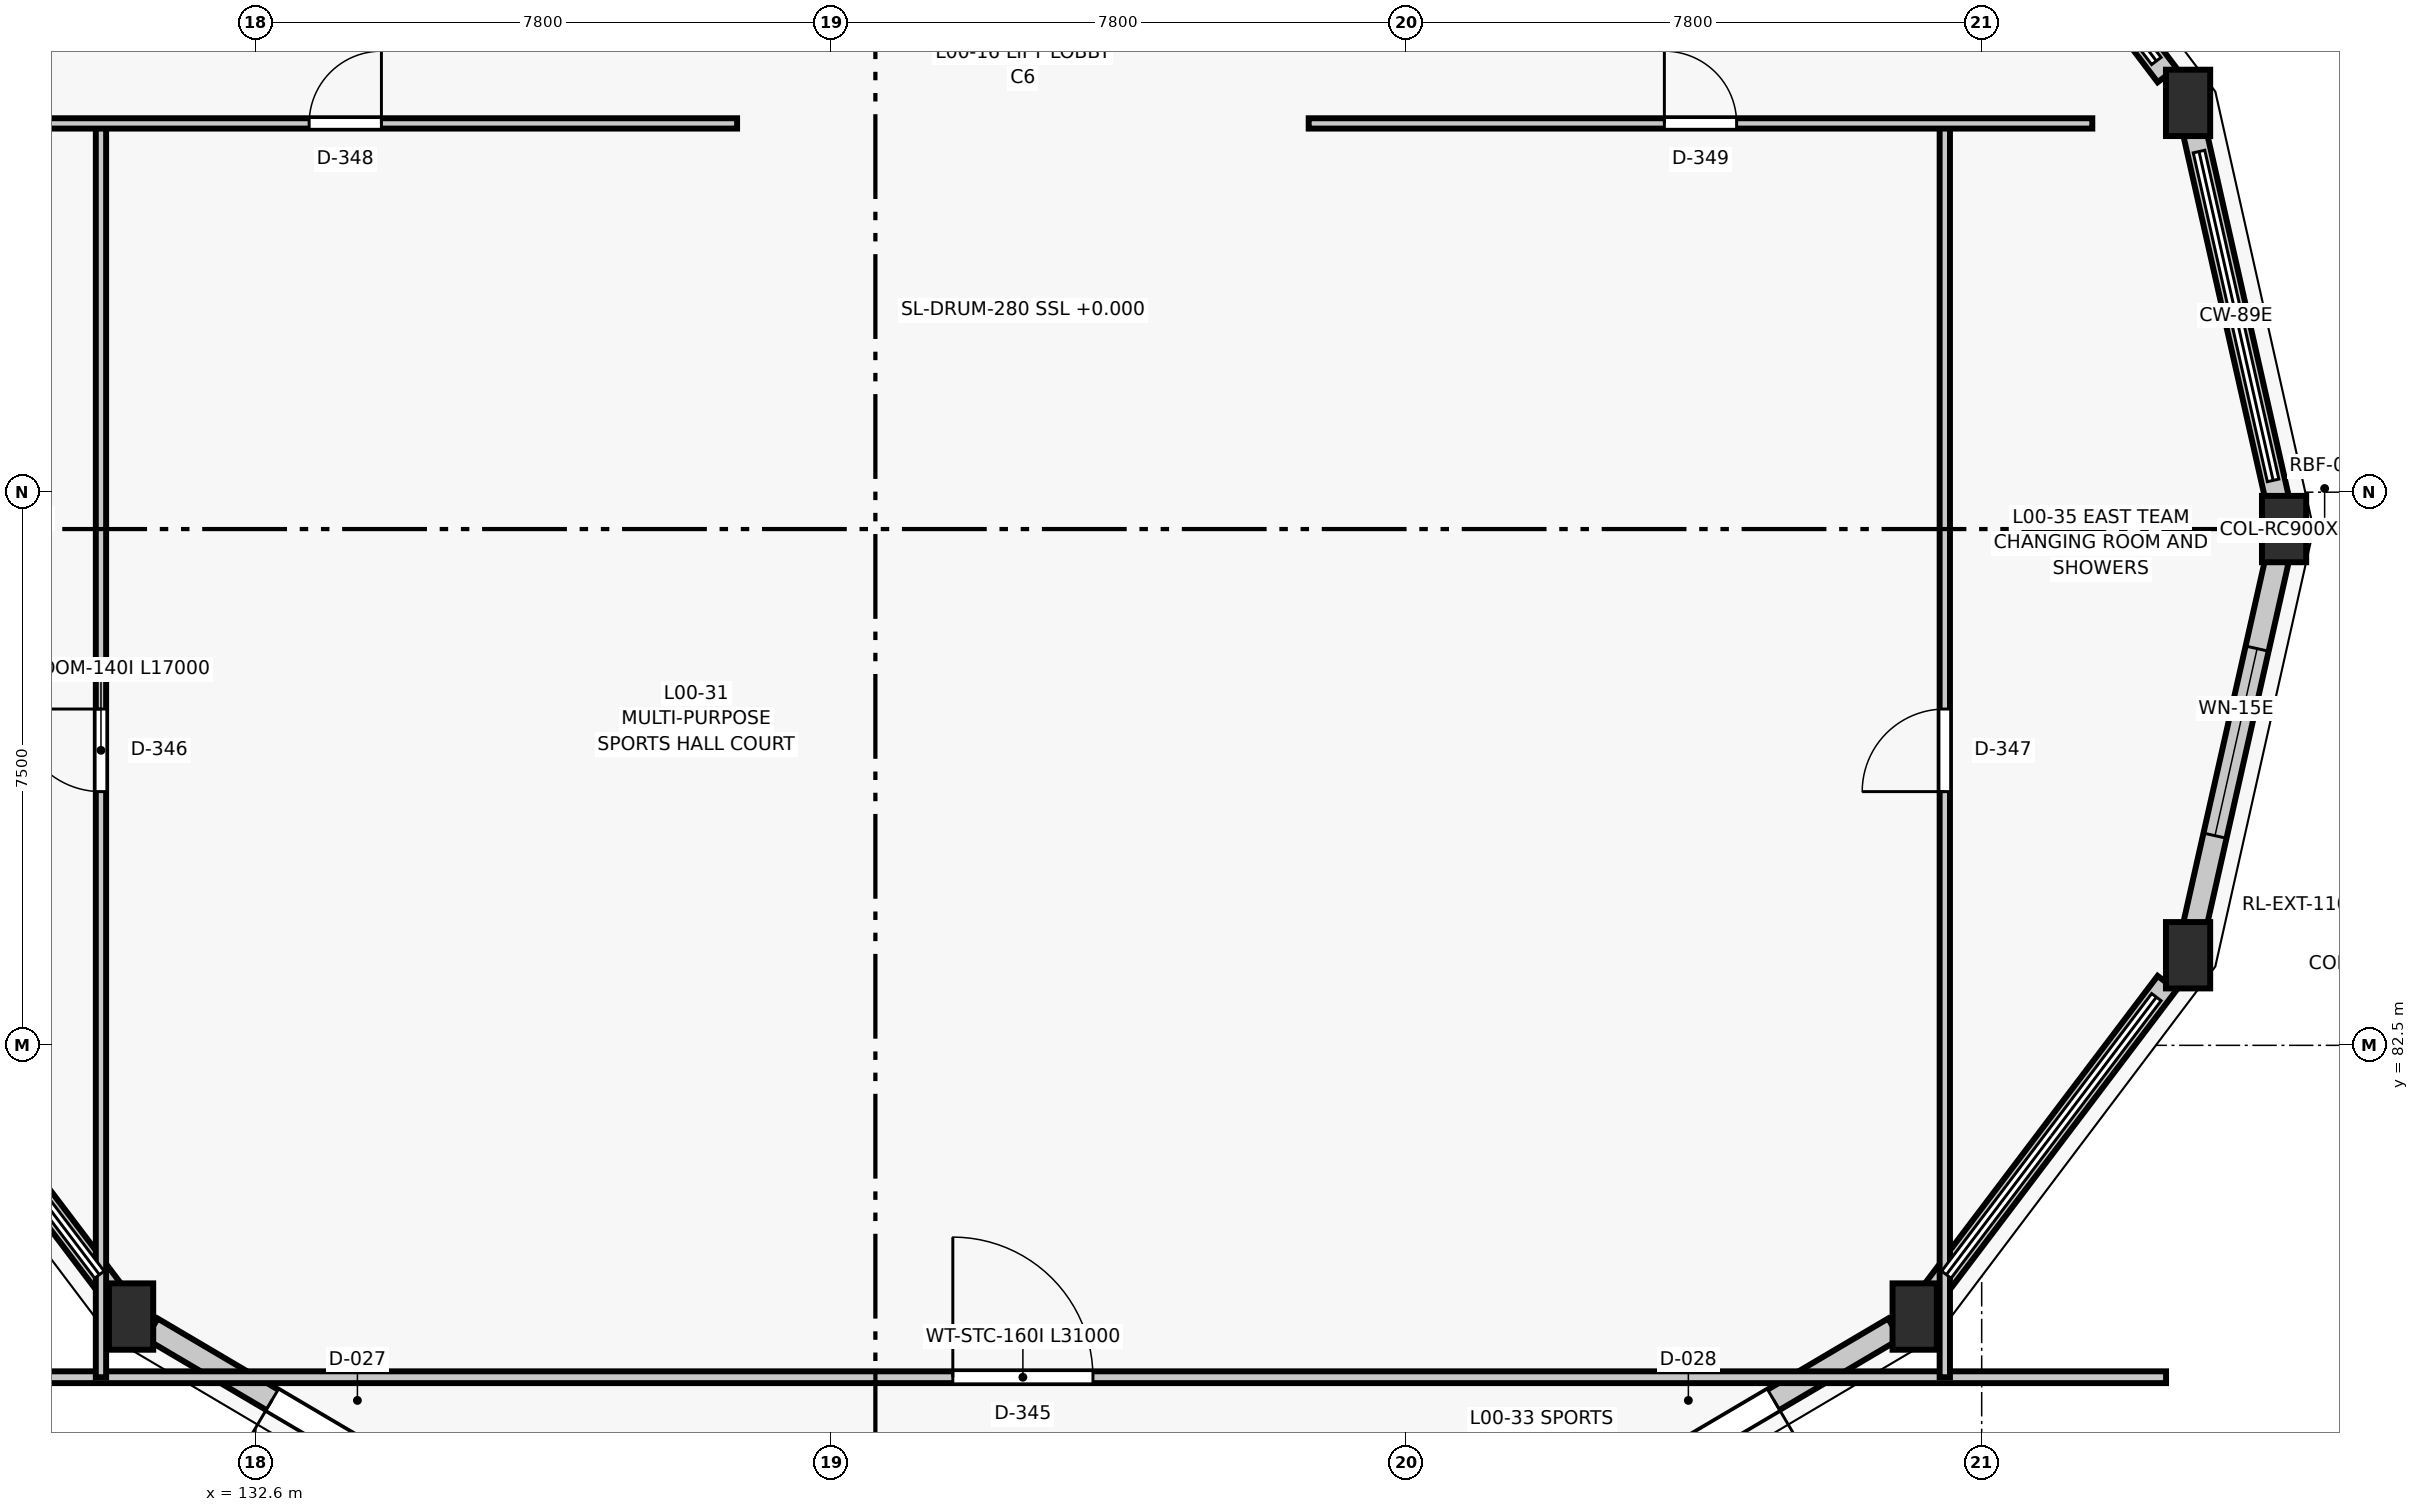
"""IFC4 building model, lengths in metres.
Left out: names, types, materials, properties, quantities, classifications, styles, units other than length and angle.
Written with IfcOpenShell. Run it as: python <this file> out.ifc"""

import sys

from ifc_helpers import new_model, si_unit, direction, frame, frame_2d, origin, origin_2d, place, context, subcontext, project, spatial, rectangle, extrude, element, fill, save


model = new_model("IFC4")
c1 = context("Model", 3, precision=1e-05, world=origin(), true_north=direction((0.0, 1.0)))
c2 = subcontext(c1, "Body", "Model", "MODEL_VIEW")
j1 = project(units=[si_unit("LENGTHUNIT", "METRE"), si_unit("PLANEANGLEUNIT", "RADIAN")], contexts=[c1])
p1 = place(None, origin())
s1 = spatial("IfcSite", under=j1, at=p1, CompositionType="ELEMENT")
p2 = place(p1, origin())
s2 = spatial("IfcBuilding", under=s1, at=p2, CompositionType="ELEMENT")
p3 = place(p2, origin())
s3 = spatial("IfcBuildingStorey", under=s2, at=p3, CompositionType="ELEMENT", Elevation=0.0)
for number, where, z_axis, x_axis in (
    (1, (160.1, 89.5, 0.0), (0.0, 0.0, 1.0), (1.0, 0.0, 0.0)),
    (2, (158.798, 95.279, 0.0), (0.0, 0.0, 1.0), (1.0, 0.0, 0.0)),
    (3, (130.908, 78.823, 0.0), (0.0, 0.0, 1.0), (1.0, 0.0, 0.0)),
    (4, (155.092, 78.823, 0.0), (0.0, 0.0, 1.0), (1.0, 0.0, 0.0)),
    (5, (158.798, 83.721, 0.0), (0.0, 0.0, 1.0), (1.0, 0.0, 0.0)),
):
    element("IfcColumn", number, at=place(p3, frame(where, z_axis=z_axis, x_axis=x_axis)), inside=s3, PredefinedType="COLUMN", context=c2, shape_type="SweptSolid", body=[
        extrude(rectangle(XDim=0.6, YDim=0.9, at=origin_2d()), origin(), (0.0, 0.0, 1.0), 4.5),
    ])
p4 = place(p3, frame((158.894, 94.853, 0.0), z_axis=(0.0, 0.0, 1.0), x_axis=(0.219744533343, -0.97555745093, 0.0)))
e6 = element("IfcWall", 6, at=p4, inside=s3, PredefinedType="STANDARD", context=c2, shape_type="SweptSolid", body=[
    extrude(rectangle(XDim=5.051, YDim=0.32, at=frame_2d((2.525, 0.0))), origin(), (0.0, 0.0, 1.0), 0.85),
])
p5 = place(p3, frame((155.376, 99.801, 0.0), z_axis=(0.0, 0.0, 1.0), x_axis=(0.603398282319, -0.797439974477, 0.0)))
e7 = element("IfcWall", 7, at=p5, inside=s3, PredefinedType="STANDARD", context=c2, shape_type="SweptSolid", body=[
    extrude(rectangle(XDim=5.199, YDim=0.32, at=frame_2d((2.599, 0.0))), origin(), (0.0, 0.0, 1.0), 0.85),
])
p6 = place(p3, frame((127.487, 95.655, 0.0), z_axis=(0.0, 0.0, 1.0), x_axis=(0.603398282319, 0.797439974477, 0.0)))
e8 = element("IfcWall", 8, at=p6, inside=s3, PredefinedType="STANDARD", context=c2, shape_type="SweptSolid", body=[
    extrude(rectangle(XDim=5.199, YDim=0.32, at=frame_2d((2.599, 0.0))), origin(), (0.0, 0.0, 1.0), 3.445),
])
p7 = place(p6, frame((1.599, 0.0, 0.0)))
e9 = element("IfcOpeningElement", 9, at=p7, cuts=e8, PredefinedType="OPENING", context=c2, shape_type="SweptSolid", body=[
    extrude(rectangle(XDim=2.0, YDim=2.3, at=frame_2d((1.0, 1.15))), frame((0.0, 0.17, 0.0), z_axis=(0.0, -1.0, 0.0), x_axis=(1.0, 0.0, 0.0)), (0.0, 0.0, 1.0), 0.34),
])
p8 = place(p3, frame((130.624, 79.199, 0.0), z_axis=(0.0, 0.0, 1.0), x_axis=(-0.603398282319, 0.797439974477, 0.0)))
e10 = element("IfcWall", 10, at=p8, inside=s3, PredefinedType="STANDARD", context=c2, shape_type="SweptSolid", body=[
    extrude(rectangle(XDim=5.199, YDim=0.32, at=frame_2d((2.599, 0.0))), origin(), (0.0, 0.0, 1.0), 0.85),
])
p9 = place(p3, frame((136.177, 75.714, 0.0), z_axis=(0.0, 0.0, 1.0), x_axis=(-0.861235880181, 0.508205429614, 0.0)))
e11 = element("IfcWall", 11, at=p9, inside=s3, PredefinedType="STANDARD", context=c2, shape_type="SweptSolid", body=[
    extrude(rectangle(XDim=5.794, YDim=0.32, at=frame_2d((2.897, 0.0))), origin(), (0.0, 0.0, 1.0), 3.445),
])
p10 = place(p9, frame((1.897, 0.0, 0.0)))
e12 = element("IfcOpeningElement", 12, at=p10, cuts=e11, PredefinedType="OPENING", context=c2, shape_type="SweptSolid", body=[
    extrude(rectangle(XDim=2.0, YDim=2.3, at=frame_2d((1.0, 1.15))), frame((0.0, 0.17, 0.0), z_axis=(0.0, -1.0, 0.0), x_axis=(1.0, 0.0, 0.0)), (0.0, 0.0, 1.0), 0.34),
])
p11 = place(p3, frame((154.813, 78.658, 0.0), z_axis=(0.0, 0.0, 1.0), x_axis=(-0.861235880181, -0.508205429614, 0.0)))
e13 = element("IfcWall", 13, at=p11, inside=s3, PredefinedType="STANDARD", context=c2, shape_type="SweptSolid", body=[
    extrude(rectangle(XDim=5.794, YDim=0.32, at=frame_2d((2.897, 0.0))), origin(), (0.0, 0.0, 1.0), 3.445),
])
p12 = place(p11, frame((1.897, 0.0, 0.0)))
e14 = element("IfcOpeningElement", 14, at=p12, cuts=e13, PredefinedType="OPENING", context=c2, shape_type="SweptSolid", body=[
    extrude(rectangle(XDim=2.0, YDim=2.3, at=frame_2d((1.0, 1.15))), frame((0.0, 0.17, 0.0), z_axis=(0.0, -1.0, 0.0), x_axis=(1.0, 0.0, 0.0)), (0.0, 0.0, 1.0), 0.34),
])
p13 = place(p3, frame((158.513, 83.345, 0.0), z_axis=(0.0, 0.0, 1.0), x_axis=(-0.603398282319, -0.797439974477, 0.0)))
e15 = element("IfcWall", 15, at=p13, inside=s3, PredefinedType="STANDARD", context=c2, shape_type="SweptSolid", body=[
    extrude(rectangle(XDim=5.199, YDim=0.32, at=frame_2d((2.599, 0.0))), origin(), (0.0, 0.0, 1.0), 0.85),
])
p14 = place(p3, frame((160.004, 89.074, 0.0), z_axis=(0.0, 0.0, 1.0), x_axis=(-0.219744533343, -0.97555745093, 0.0)))
e16 = element("IfcWall", 16, at=p14, inside=s3, PredefinedType="STANDARD", context=c2, shape_type="SweptSolid", body=[
    extrude(rectangle(XDim=5.051, YDim=0.32, at=frame_2d((2.525, 0.0))), origin(), (0.0, 0.0, 1.0), 3.445),
])
p15 = place(p14, frame((1.225, 0.0, 0.9)))
e17 = element("IfcOpeningElement", 17, at=p15, cuts=e16, PredefinedType="OPENING", context=c2, shape_type="SweptSolid", body=[
    extrude(rectangle(XDim=2.6, YDim=1.55, at=frame_2d((1.3, 0.775))), frame((0.0, 0.17, 0.0), z_axis=(0.0, -1.0, 0.0), x_axis=(1.0, 0.0, 0.0)), (0.0, 0.0, 1.0), 0.34),
])
p16 = place(p3, frame((127.5, 78.0, 0.0), z_axis=(0.0, 0.0, 1.0), x_axis=(1.0, 0.0, 0.0)))
e18 = element("IfcWall", 18, at=p16, inside=s3, PredefinedType="PARTITIONING", context=c2, shape_type="SweptSolid", body=[
    extrude(rectangle(XDim=31.0, YDim=0.16, at=frame_2d((15.5, 0.0))), origin(), (0.0, 0.0, 1.0), 4.255),
])
p17 = place(p16, frame((14.55, 0.0, 0.0)))
e19 = element("IfcOpeningElement", 19, at=p17, cuts=e18, PredefinedType="OPENING", context=c2, shape_type="SweptSolid", body=[
    extrude(rectangle(XDim=1.9, YDim=2.25, at=frame_2d((0.95, 1.125))), frame((0.0, 0.09, 0.0), z_axis=(0.0, -1.0, 0.0), x_axis=(1.0, 0.0, 0.0)), (0.0, 0.0, 1.0), 0.18),
])
p18 = place(p3, frame((130.5, 78.0, 0.0), z_axis=(0.0, 0.0, 1.0), x_axis=(0.0, 1.0, 0.0)))
e20 = element("IfcWall", 20, at=p18, inside=s3, PredefinedType="PARTITIONING", context=c2, shape_type="SweptSolid", body=[
    extrude(rectangle(XDim=17.0, YDim=0.14, at=frame_2d((8.5, 0.0))), origin(), (0.0, 0.0, 1.0), 4.255),
])
p19 = place(p18, frame((7.94, 0.0, 0.0)))
e21 = element("IfcOpeningElement", 21, at=p19, cuts=e20, PredefinedType="OPENING", context=c2, shape_type="SweptSolid", body=[
    extrude(rectangle(XDim=1.12, YDim=2.1, at=frame_2d((0.56, 1.05))), frame((0.0, 0.08, 0.0), z_axis=(0.0, -1.0, 0.0), x_axis=(1.0, 0.0, 0.0)), (0.0, 0.0, 1.0), 0.16),
])
p20 = place(p3, frame((155.5, 78.0, 0.0), z_axis=(0.0, 0.0, 1.0), x_axis=(0.0, 1.0, 0.0)))
e22 = element("IfcWall", 22, at=p20, inside=s3, PredefinedType="PARTITIONING", context=c2, shape_type="SweptSolid", body=[
    extrude(rectangle(XDim=17.0, YDim=0.14, at=frame_2d((8.5, 0.0))), origin(), (0.0, 0.0, 1.0), 4.255),
])
p21 = place(p20, frame((7.94, 0.0, 0.0)))
e23 = element("IfcOpeningElement", 23, at=p21, cuts=e22, PredefinedType="OPENING", context=c2, shape_type="SweptSolid", body=[
    extrude(rectangle(XDim=1.12, YDim=2.1, at=frame_2d((0.56, 1.05))), frame((0.0, 0.08, 0.0), z_axis=(0.0, -1.0, 0.0), x_axis=(1.0, 0.0, 0.0)), (0.0, 0.0, 1.0), 0.16),
])
p22 = place(p3, frame((128.5, 95.0, 0.0), z_axis=(0.0, 0.0, 1.0), x_axis=(1.0, 0.0, 0.0)))
e24 = element("IfcWall", 24, at=p22, inside=s3, PredefinedType="PARTITIONING", context=c2, shape_type="SweptSolid", body=[
    extrude(rectangle(XDim=10.625, YDim=0.14, at=frame_2d((5.312, 0.0))), origin(), (0.0, 0.0, 1.0), 4.255),
])
p23 = place(p22, frame((4.823, 0.0, 0.0)))
e25 = element("IfcOpeningElement", 25, at=p23, cuts=e24, PredefinedType="OPENING", context=c2, shape_type="SweptSolid", body=[
    extrude(rectangle(XDim=0.98, YDim=2.1, at=frame_2d((0.49, 1.05))), frame((0.0, 0.08, 0.0), z_axis=(0.0, -1.0, 0.0), x_axis=(1.0, 0.0, 0.0)), (0.0, 0.0, 1.0), 0.16),
])
p24 = place(p3, frame((146.875, 95.0, 0.0), z_axis=(0.0, 0.0, 1.0), x_axis=(1.0, 0.0, 0.0)))
e26 = element("IfcWall", 26, at=p24, inside=s3, PredefinedType="PARTITIONING", context=c2, shape_type="SweptSolid", body=[
    extrude(rectangle(XDim=10.625, YDim=0.14, at=frame_2d((5.312, 0.0))), origin(), (0.0, 0.0, 1.0), 4.255),
])
p25 = place(p24, frame((4.823, 0.0, 0.0)))
e27 = element("IfcOpeningElement", 27, at=p25, cuts=e26, PredefinedType="OPENING", context=c2, shape_type="SweptSolid", body=[
    extrude(rectangle(XDim=0.98, YDim=2.1, at=frame_2d((0.49, 1.05))), frame((0.0, 0.08, 0.0), z_axis=(0.0, -1.0, 0.0), x_axis=(1.0, 0.0, 0.0)), (0.0, 0.0, 1.0), 0.16),
])
p26 = place(p10, origin())
e28 = element("IfcDoor", 28, at=p26, inside=s3, OperationType="SINGLE_SWING_RIGHT", PredefinedType="DOOR", context=c2, shape_type="SweptSolid", body=[
    extrude(rectangle(XDim=2.0, YDim=2.3, at=frame_2d((1.0, 1.15))), frame((0.0, 0.025, 0.0), z_axis=(0.0, -1.0, 0.0), x_axis=(1.0, 0.0, 0.0)), (0.0, 0.0, 1.0), 0.05),
])
fill(e12, e28)
p27 = place(p12, origin())
e29 = element("IfcDoor", 29, at=p27, inside=s3, OperationType="SINGLE_SWING_LEFT", PredefinedType="DOOR", context=c2, shape_type="SweptSolid", body=[
    extrude(rectangle(XDim=2.0, YDim=2.3, at=frame_2d((1.0, 1.15))), frame((0.0, 0.025, 0.0), z_axis=(0.0, -1.0, 0.0), x_axis=(1.0, 0.0, 0.0)), (0.0, 0.0, 1.0), 0.05),
])
fill(e14, e29)
p28 = place(p15, origin())
e30 = element("IfcWindow", 30, at=p28, inside=s3, PartitioningType="SINGLE_PANEL", PredefinedType="WINDOW", context=c2, shape_type="SweptSolid", body=[
    extrude(rectangle(XDim=2.6, YDim=1.55, at=frame_2d((1.3, 0.775))), frame((0.0, 0.03, 0.0), z_axis=(0.0, -1.0, 0.0), x_axis=(1.0, 0.0, 0.0)), (0.0, 0.0, 1.0), 0.06),
])
fill(e17, e30)
p29 = place(p17, origin())
e31 = element("IfcDoor", 31, at=p29, inside=s3, OperationType="SINGLE_SWING_LEFT", PredefinedType="DOOR", context=c2, shape_type="SweptSolid", body=[
    extrude(rectangle(XDim=1.9, YDim=2.25, at=frame_2d((0.95, 1.125))), frame((0.0, 0.025, 0.0), z_axis=(0.0, -1.0, 0.0), x_axis=(1.0, 0.0, 0.0)), (0.0, 0.0, 1.0), 0.05),
])
fill(e19, e31)
p30 = place(p19, origin())
e32 = element("IfcDoor", 32, at=p30, inside=s3, OperationType="SINGLE_SWING_RIGHT", PredefinedType="DOOR", context=c2, shape_type="SweptSolid", body=[
    extrude(rectangle(XDim=1.12, YDim=2.1, at=frame_2d((0.56, 1.05))), frame((0.0, 0.025, 0.0), z_axis=(0.0, -1.0, 0.0), x_axis=(1.0, 0.0, 0.0)), (0.0, 0.0, 1.0), 0.05),
])
fill(e21, e32)
p31 = place(p21, origin())
e33 = element("IfcDoor", 33, at=p31, inside=s3, OperationType="SINGLE_SWING_LEFT", PredefinedType="DOOR", context=c2, shape_type="SweptSolid", body=[
    extrude(rectangle(XDim=1.12, YDim=2.1, at=frame_2d((0.56, 1.05))), frame((0.0, 0.025, 0.0), z_axis=(0.0, -1.0, 0.0), x_axis=(1.0, 0.0, 0.0)), (0.0, 0.0, 1.0), 0.05),
])
fill(e23, e33)
p32 = place(p23, origin())
e34 = element("IfcDoor", 34, at=p32, inside=s3, OperationType="SINGLE_SWING_RIGHT", PredefinedType="DOOR", context=c2, shape_type="SweptSolid", body=[
    extrude(rectangle(XDim=0.98, YDim=2.1, at=frame_2d((0.49, 1.05))), frame((0.0, 0.025, 0.0), z_axis=(0.0, -1.0, 0.0), x_axis=(1.0, 0.0, 0.0)), (0.0, 0.0, 1.0), 0.05),
])
fill(e25, e34)
p33 = place(p25, origin())
e35 = element("IfcDoor", 35, at=p33, inside=s3, OperationType="SINGLE_SWING_LEFT", PredefinedType="DOOR", context=c2, shape_type="SweptSolid", body=[
    extrude(rectangle(XDim=0.98, YDim=2.1, at=frame_2d((0.49, 1.05))), frame((0.0, 0.025, 0.0), z_axis=(0.0, -1.0, 0.0), x_axis=(1.0, 0.0, 0.0)), (0.0, 0.0, 1.0), 0.05),
])
fill(e27, e35)
save(model, sys.argv[1])
